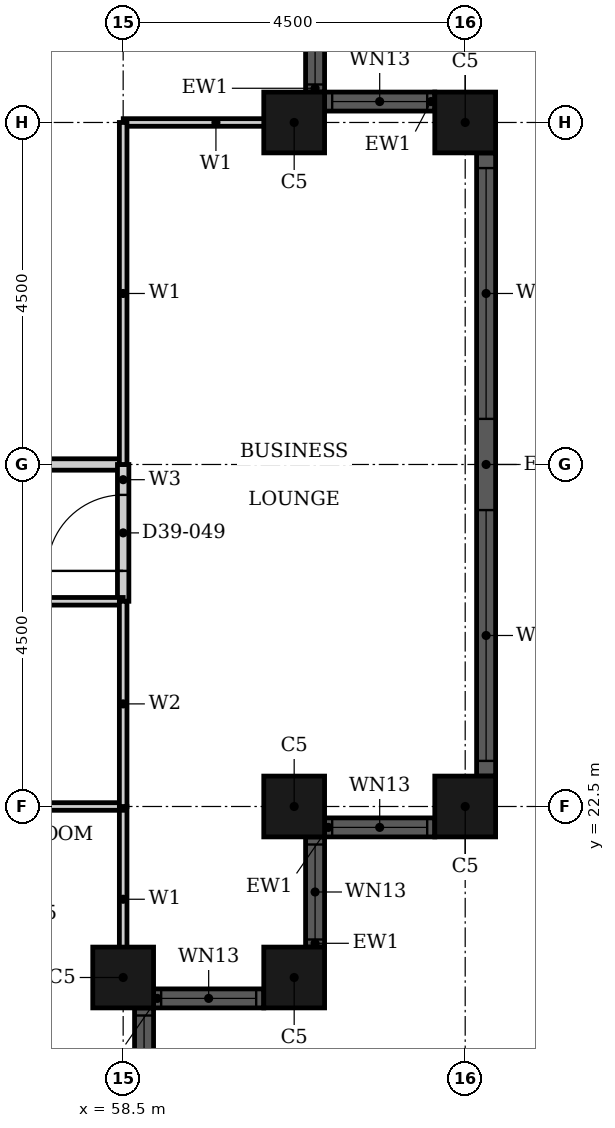
"""IFC4 building model, lengths in metres.
Left out: names, types, materials, properties, quantities, classifications, styles, units other than length and angle.
Written with IfcOpenShell. Run it as: python <this file> out.ifc"""

import sys

from ifc_helpers import new_model, si_unit, direction, frame, frame_2d, origin, origin_2d, place, context, subcontext, project, spatial, rectangle, hollow_rectangle, extrude, element, fill, save


model = new_model("IFC4")
c1 = context("Model", 3, precision=1e-05, world=origin(), true_north=direction((0.0, 1.0)))
c2 = subcontext(c1, "Body", "Model", "MODEL_VIEW")
j1 = project(units=[si_unit("LENGTHUNIT", "METRE"), si_unit("PLANEANGLEUNIT", "RADIAN")], contexts=[c1])
p1 = place(None, origin())
s1 = spatial("IfcSite", under=j1, at=p1, CompositionType="ELEMENT")
p2 = place(p1, origin())
s2 = spatial("IfcBuilding", under=s1, at=p2, CompositionType="ELEMENT")
p3 = place(p2, frame((0.0, 0.0, 158.0)))
s3 = spatial("IfcBuildingStorey", under=s2, at=p3, CompositionType="ELEMENT", Elevation=158.0)
for number, where, z_axis, x_axis in (
    (1, (58.5, 20.25, 0.0), (0.0, 0.0, 1.0), (1.0, 0.0, 0.0)),
    (2, (60.75, 20.25, 0.0), (0.0, 0.0, 1.0), (1.0, 0.0, 0.0)),
    (3, (60.75, 22.5, 0.0), (0.0, 0.0, 1.0), (1.0, 0.0, 0.0)),
    (4, (63.0, 22.5, 0.0), (0.0, 0.0, 1.0), (1.0, 0.0, 0.0)),
    (5, (63.0, 31.5, 0.0), (0.0, 0.0, 1.0), (1.0, 0.0, 0.0)),
    (6, (60.75, 31.5, 0.0), (0.0, 0.0, 1.0), (1.0, 0.0, 0.0)),
):
    element("IfcColumn", number, at=place(p3, frame(where, z_axis=z_axis, x_axis=x_axis)), inside=s3, PredefinedType="COLUMN", context=c2, shape_type="SweptSolid", body=[
        extrude(hollow_rectangle(XDim=0.8, YDim=0.8, WallThickness=0.025, at=origin_2d()), origin(), (0.0, 0.0, 1.0), 3.7),
    ])
p4 = place(p3, frame((58.775, 18.4, 0.0), z_axis=(0.0, 0.0, 1.0), x_axis=(0.0, 1.0, 0.0)))
e7 = element("IfcWall", 7, at=p4, inside=s3, PredefinedType="SOLIDWALL", context=c2, shape_type="SweptSolid", body=[
    extrude(rectangle(XDim=1.45, YDim=0.25, at=frame_2d((0.725, 0.0))), origin(), (0.0, 0.0, 1.0), 3.7),
])
p5 = place(p4, frame((0.1, 0.0, 0.9)))
e8 = element("IfcOpeningElement", 8, at=p5, cuts=e7, PredefinedType="OPENING", context=c2, shape_type="SweptSolid", body=[
    extrude(rectangle(XDim=1.25, YDim=1.85, at=frame_2d((0.625, 0.925))), frame((0.0, 0.135, 0.0), z_axis=(0.0, -1.0, 0.0), x_axis=(1.0, 0.0, 0.0)), (0.0, 0.0, 1.0), 0.27),
])
p6 = place(p3, frame((58.9, 19.975, 0.0), z_axis=(0.0, 0.0, 1.0), x_axis=(1.0, 0.0, 0.0)))
e9 = element("IfcWall", 9, at=p6, inside=s3, PredefinedType="SOLIDWALL", context=c2, shape_type="SweptSolid", body=[
    extrude(rectangle(XDim=1.45, YDim=0.25, at=frame_2d((0.725, 0.0))), origin(), (0.0, 0.0, 1.0), 3.7),
])
p7 = place(p6, frame((0.1, 0.0, 0.9)))
e10 = element("IfcOpeningElement", 10, at=p7, cuts=e9, PredefinedType="OPENING", context=c2, shape_type="SweptSolid", body=[
    extrude(rectangle(XDim=1.25, YDim=1.85, at=frame_2d((0.625, 0.925))), frame((0.0, 0.135, 0.0), z_axis=(0.0, -1.0, 0.0), x_axis=(1.0, 0.0, 0.0)), (0.0, 0.0, 1.0), 0.27),
])
p8 = place(p3, frame((61.025, 20.65, 0.0), z_axis=(0.0, 0.0, 1.0), x_axis=(0.0, 1.0, 0.0)))
e11 = element("IfcWall", 11, at=p8, inside=s3, PredefinedType="SOLIDWALL", context=c2, shape_type="SweptSolid", body=[
    extrude(rectangle(XDim=1.45, YDim=0.25, at=frame_2d((0.725, 0.0))), origin(), (0.0, 0.0, 1.0), 3.7),
])
p9 = place(p8, frame((0.1, 0.0, 0.9)))
e12 = element("IfcOpeningElement", 12, at=p9, cuts=e11, PredefinedType="OPENING", context=c2, shape_type="SweptSolid", body=[
    extrude(rectangle(XDim=1.25, YDim=1.85, at=frame_2d((0.625, 0.925))), frame((0.0, 0.135, 0.0), z_axis=(0.0, -1.0, 0.0), x_axis=(1.0, 0.0, 0.0)), (0.0, 0.0, 1.0), 0.27),
])
p10 = place(p3, frame((61.15, 22.225, 0.0), z_axis=(0.0, 0.0, 1.0), x_axis=(1.0, 0.0, 0.0)))
e13 = element("IfcWall", 13, at=p10, inside=s3, PredefinedType="SOLIDWALL", context=c2, shape_type="SweptSolid", body=[
    extrude(rectangle(XDim=1.45, YDim=0.25, at=frame_2d((0.725, 0.0))), origin(), (0.0, 0.0, 1.0), 3.7),
])
p11 = place(p10, frame((0.1, 0.0, 0.9)))
e14 = element("IfcOpeningElement", 14, at=p11, cuts=e13, PredefinedType="OPENING", context=c2, shape_type="SweptSolid", body=[
    extrude(rectangle(XDim=1.25, YDim=1.85, at=frame_2d((0.625, 0.925))), frame((0.0, 0.135, 0.0), z_axis=(0.0, -1.0, 0.0), x_axis=(1.0, 0.0, 0.0)), (0.0, 0.0, 1.0), 0.27),
])
p12 = place(p3, frame((63.275, 22.9, 0.0), z_axis=(0.0, 0.0, 1.0), x_axis=(0.0, 1.0, 0.0)))
e15 = element("IfcWall", 15, at=p12, inside=s3, PredefinedType="SOLIDWALL", context=c2, shape_type="SweptSolid", body=[
    extrude(rectangle(XDim=8.2, YDim=0.25, at=frame_2d((4.1, 0.0))), origin(), (0.0, 0.0, 1.0), 3.7),
])
p13 = place(p12, frame((0.2, 0.0, 0.45)))
e16 = element("IfcOpeningElement", 16, at=p13, cuts=e15, PredefinedType="OPENING", context=c2, shape_type="SweptSolid", body=[
    extrude(rectangle(XDim=3.3, YDim=2.3, at=frame_2d((1.65, 1.15))), frame((0.0, 0.135, 0.0), z_axis=(0.0, -1.0, 0.0), x_axis=(1.0, 0.0, 0.0)), (0.0, 0.0, 1.0), 0.27),
])
p14 = place(p12, frame((4.7, 0.0, 0.45)))
e17 = element("IfcOpeningElement", 17, at=p14, cuts=e15, PredefinedType="OPENING", context=c2, shape_type="SweptSolid", body=[
    extrude(rectangle(XDim=3.3, YDim=2.3, at=frame_2d((1.65, 1.15))), frame((0.0, 0.135, 0.0), z_axis=(0.0, -1.0, 0.0), x_axis=(1.0, 0.0, 0.0)), (0.0, 0.0, 1.0), 0.27),
])
p15 = place(p3, frame((62.6, 31.775, 0.0), z_axis=(0.0, 0.0, 1.0), x_axis=(-1.0, 0.0, 0.0)))
e18 = element("IfcWall", 18, at=p15, inside=s3, PredefinedType="SOLIDWALL", context=c2, shape_type="SweptSolid", body=[
    extrude(rectangle(XDim=1.45, YDim=0.25, at=frame_2d((0.725, 0.0))), origin(), (0.0, 0.0, 1.0), 3.7),
])
p16 = place(p15, frame((0.1, 0.0, 0.9)))
e19 = element("IfcOpeningElement", 19, at=p16, cuts=e18, PredefinedType="OPENING", context=c2, shape_type="SweptSolid", body=[
    extrude(rectangle(XDim=1.25, YDim=1.85, at=frame_2d((0.625, 0.925))), frame((0.0, 0.135, 0.0), z_axis=(0.0, -1.0, 0.0), x_axis=(1.0, 0.0, 0.0)), (0.0, 0.0, 1.0), 0.27),
])
p17 = place(p3, frame((61.025, 31.9, 0.0), z_axis=(0.0, 0.0, 1.0), x_axis=(0.0, 1.0, 0.0)))
e20 = element("IfcWall", 20, at=p17, inside=s3, PredefinedType="SOLIDWALL", context=c2, shape_type="SweptSolid", body=[
    extrude(rectangle(XDim=1.45, YDim=0.25, at=frame_2d((0.725, 0.0))), origin(), (0.0, 0.0, 1.0), 3.7),
])
p18 = place(p17, frame((0.1, 0.0, 0.9)))
e21 = element("IfcOpeningElement", 21, at=p18, cuts=e20, PredefinedType="OPENING", context=c2, shape_type="SweptSolid", body=[
    extrude(rectangle(XDim=1.25, YDim=1.85, at=frame_2d((0.625, 0.925))), frame((0.0, 0.135, 0.0), z_axis=(0.0, -1.0, 0.0), x_axis=(1.0, 0.0, 0.0)), (0.0, 0.0, 1.0), 0.27),
])
p19 = place(p3, frame((45.0, 27.0, 0.0), z_axis=(0.0, 0.0, 1.0), x_axis=(1.0, 0.0, 0.0)))
e22 = element("IfcWall", 22, at=p19, inside=s3, PredefinedType="PARTITIONING", context=c2, shape_type="SweptSolid", body=[
    extrude(rectangle(XDim=13.5, YDim=0.15, at=frame_2d((6.75, 0.0))), origin(), (0.0, 0.0, 1.0), 2.68),
])
p20 = place(p19, frame((7.15, 0.0, 0.0)))
e23 = element("IfcOpeningElement", 23, at=p20, cuts=e22, PredefinedType="OPENING", context=c2, shape_type="SweptSolid", body=[
    extrude(rectangle(XDim=1.0, YDim=2.1, at=frame_2d((0.5, 1.05))), frame((0.0, 0.085, 0.0), z_axis=(0.0, -1.0, 0.0), x_axis=(1.0, 0.0, 0.0)), (0.0, 0.0, 1.0), 0.17),
])
p21 = place(p3, frame((58.5, 25.2, 0.0), z_axis=(0.0, 0.0, 1.0), x_axis=(0.0, 1.0, 0.0)))
e24 = element("IfcWall", 24, at=p21, inside=s3, PredefinedType="PARTITIONING", context=c2, shape_type="SweptSolid", body=[
    extrude(rectangle(XDim=1.8, YDim=0.15, at=frame_2d((0.9, 0.0))), origin(), (0.0, 0.0, 1.0), 3.4),
])
p22 = place(p21, frame((0.4, 0.0, 0.0)))
e25 = element("IfcOpeningElement", 25, at=p22, cuts=e24, PredefinedType="OPENING", context=c2, shape_type="SweptSolid", body=[
    extrude(rectangle(XDim=1.0, YDim=2.1, at=frame_2d((0.5, 1.05))), frame((0.0, 0.085, 0.0), z_axis=(0.0, -1.0, 0.0), x_axis=(1.0, 0.0, 0.0)), (0.0, 0.0, 1.0), 0.17),
])
p23 = place(p3, frame((58.501, 31.5, 0.0), z_axis=(0.0, 0.0, 1.0), x_axis=(1.0, 0.0, 0.0)))
e26 = element("IfcWall", 26, at=p23, inside=s3, PredefinedType="PARTITIONING", context=c2, shape_type="SweptSolid", body=[
    extrude(rectangle(XDim=2.439, YDim=0.1, at=frame_2d((1.219, 0.0))), origin(), (0.0, 0.0, 1.0), 2.68),
])
p24 = place(p3, frame((58.5, 27.0, 0.0), z_axis=(0.0, 0.0, 1.0), x_axis=(0.0, 1.0, 0.0)))
e27 = element("IfcWall", 27, at=p24, inside=s3, PredefinedType="PARTITIONING", context=c2, shape_type="SweptSolid", body=[
    extrude(rectangle(XDim=4.5, YDim=0.1, at=frame_2d((2.25, 0.0))), origin(), (0.0, 0.0, 1.0), 3.4),
])
p25 = place(p3, frame((58.5, 20.06, 0.0), z_axis=(0.0, 0.0, 1.0), x_axis=(0.0, 1.0, 0.0)))
e28 = element("IfcWall", 28, at=p25, inside=s3, PredefinedType="PARTITIONING", context=c2, shape_type="SweptSolid", body=[
    extrude(rectangle(XDim=2.439, YDim=0.1, at=frame_2d((1.219, 0.0))), origin(), (0.0, 0.0, 1.0), 3.4),
])
p26 = place(p3, frame((56.1, 22.5, 0.0), z_axis=(0.0, 0.0, 1.0), x_axis=(1.0, 0.0, 0.0)))
e29 = element("IfcWall", 29, at=p26, inside=s3, PredefinedType="PARTITIONING", context=c2, shape_type="SweptSolid", body=[
    extrude(rectangle(XDim=2.4, YDim=0.1, at=frame_2d((1.2, 0.0))), origin(), (0.0, 0.0, 1.0), 2.68),
])
p27 = place(p3, frame((56.1, 25.2, 0.0), z_axis=(0.0, 0.0, 1.0), x_axis=(1.0, 0.0, 0.0)))
e30 = element("IfcWall", 30, at=p27, inside=s3, PredefinedType="PARTITIONING", context=c2, shape_type="SweptSolid", body=[
    extrude(rectangle(XDim=2.4, YDim=0.1, at=frame_2d((1.2, 0.0))), origin(), (0.0, 0.0, 1.0), 3.4),
])
p28 = place(p3, frame((58.5, 22.5, 0.0), z_axis=(0.0, 0.0, 1.0), x_axis=(0.0, 1.0, 0.0)))
e31 = element("IfcWall", 31, at=p28, inside=s3, PredefinedType="PARTITIONING", context=c2, shape_type="SweptSolid", body=[
    extrude(rectangle(XDim=2.7, YDim=0.1, at=frame_2d((1.35, 0.0))), origin(), (0.0, 0.0, 1.0), 3.4),
])
p29 = place(p5, origin())
e32 = element("IfcWindow", 32, at=p29, inside=s3, PartitioningType="SINGLE_PANEL", PredefinedType="WINDOW", context=c2, shape_type="SweptSolid", body=[
    extrude(rectangle(XDim=1.25, YDim=1.85, at=frame_2d((0.625, 0.925))), frame((0.0, 0.03, 0.0), z_axis=(0.0, -1.0, 0.0), x_axis=(1.0, 0.0, 0.0)), (0.0, 0.0, 1.0), 0.06),
])
fill(e8, e32)
p30 = place(p7, origin())
e33 = element("IfcWindow", 33, at=p30, inside=s3, PartitioningType="SINGLE_PANEL", PredefinedType="WINDOW", context=c2, shape_type="SweptSolid", body=[
    extrude(rectangle(XDim=1.25, YDim=1.85, at=frame_2d((0.625, 0.925))), frame((0.0, 0.03, 0.0), z_axis=(0.0, -1.0, 0.0), x_axis=(1.0, 0.0, 0.0)), (0.0, 0.0, 1.0), 0.06),
])
fill(e10, e33)
p31 = place(p9, origin())
e34 = element("IfcWindow", 34, at=p31, inside=s3, PartitioningType="SINGLE_PANEL", PredefinedType="WINDOW", context=c2, shape_type="SweptSolid", body=[
    extrude(rectangle(XDim=1.25, YDim=1.85, at=frame_2d((0.625, 0.925))), frame((0.0, 0.03, 0.0), z_axis=(0.0, -1.0, 0.0), x_axis=(1.0, 0.0, 0.0)), (0.0, 0.0, 1.0), 0.06),
])
fill(e12, e34)
p32 = place(p11, origin())
e35 = element("IfcWindow", 35, at=p32, inside=s3, PartitioningType="SINGLE_PANEL", PredefinedType="WINDOW", context=c2, shape_type="SweptSolid", body=[
    extrude(rectangle(XDim=1.25, YDim=1.85, at=frame_2d((0.625, 0.925))), frame((0.0, 0.03, 0.0), z_axis=(0.0, -1.0, 0.0), x_axis=(1.0, 0.0, 0.0)), (0.0, 0.0, 1.0), 0.06),
])
fill(e14, e35)
p33 = place(p13, origin())
e36 = element("IfcWindow", 36, at=p33, inside=s3, PartitioningType="SINGLE_PANEL", PredefinedType="WINDOW", context=c2, shape_type="SweptSolid", body=[
    extrude(rectangle(XDim=3.3, YDim=2.3, at=frame_2d((1.65, 1.15))), frame((0.0, 0.03, 0.0), z_axis=(0.0, -1.0, 0.0), x_axis=(1.0, 0.0, 0.0)), (0.0, 0.0, 1.0), 0.06),
])
fill(e16, e36)
p34 = place(p14, origin())
e37 = element("IfcWindow", 37, at=p34, inside=s3, PartitioningType="SINGLE_PANEL", PredefinedType="WINDOW", context=c2, shape_type="SweptSolid", body=[
    extrude(rectangle(XDim=3.3, YDim=2.3, at=frame_2d((1.65, 1.15))), frame((0.0, 0.03, 0.0), z_axis=(0.0, -1.0, 0.0), x_axis=(1.0, 0.0, 0.0)), (0.0, 0.0, 1.0), 0.06),
])
fill(e17, e37)
p35 = place(p16, origin())
e38 = element("IfcWindow", 38, at=p35, inside=s3, PartitioningType="SINGLE_PANEL", PredefinedType="WINDOW", context=c2, shape_type="SweptSolid", body=[
    extrude(rectangle(XDim=1.25, YDim=1.85, at=frame_2d((0.625, 0.925))), frame((0.0, 0.03, 0.0), z_axis=(0.0, -1.0, 0.0), x_axis=(1.0, 0.0, 0.0)), (0.0, 0.0, 1.0), 0.06),
])
fill(e19, e38)
p36 = place(p18, origin())
e39 = element("IfcWindow", 39, at=p36, inside=s3, PartitioningType="SINGLE_PANEL", PredefinedType="WINDOW", context=c2, shape_type="SweptSolid", body=[
    extrude(rectangle(XDim=1.25, YDim=1.85, at=frame_2d((0.625, 0.925))), frame((0.0, 0.03, 0.0), z_axis=(0.0, -1.0, 0.0), x_axis=(1.0, 0.0, 0.0)), (0.0, 0.0, 1.0), 0.06),
])
fill(e21, e39)
p37 = place(p22, origin())
e40 = element("IfcDoor", 40, at=p37, inside=s3, OperationType="SINGLE_SWING_LEFT", PredefinedType="DOOR", context=c2, shape_type="SweptSolid", body=[
    extrude(rectangle(XDim=1.0, YDim=2.1, at=frame_2d((0.5, 1.05))), frame((0.0, 0.025, 0.0), z_axis=(0.0, -1.0, 0.0), x_axis=(1.0, 0.0, 0.0)), (0.0, 0.0, 1.0), 0.05),
])
fill(e25, e40)
save(model, sys.argv[1])
